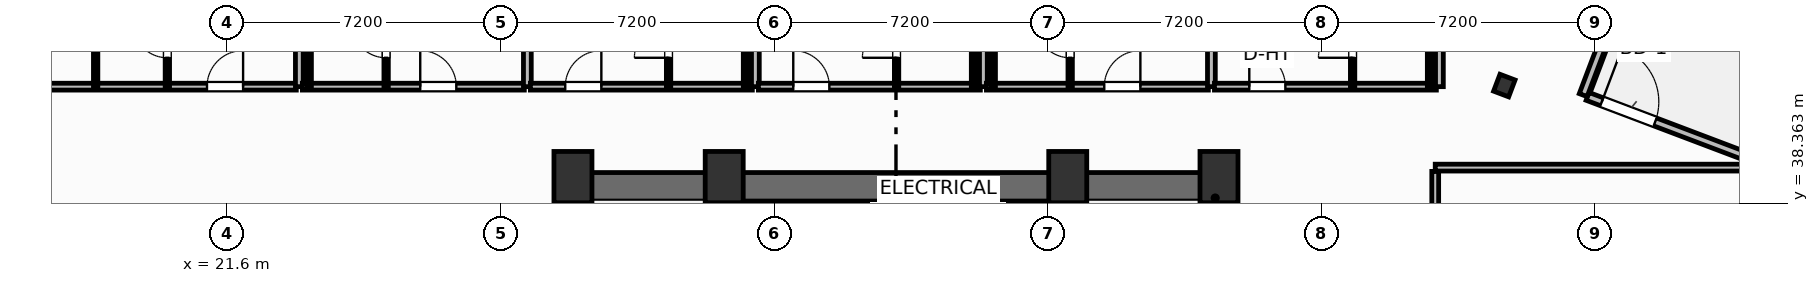
"""IFC4 building model, lengths in metres.
Left out: names, types, materials, properties, quantities, classifications, styles, units other than length and angle.
Written with IfcOpenShell. Run it as: python <this file> out.ifc"""

import sys

from ifc_helpers import new_model, si_unit, direction, frame, frame_2d, origin, origin_2d, place, context, subcontext, project, spatial, rectangle, i_section, extrude, element, fill, save


model = new_model("IFC4")
c1 = context("Model", 3, precision=1e-05, world=origin(), true_north=direction((0.0, 1.0)))
c2 = subcontext(c1, "Body", "Model", "MODEL_VIEW")
j1 = project(units=[si_unit("LENGTHUNIT", "METRE"), si_unit("PLANEANGLEUNIT", "RADIAN")], contexts=[c1])
p1 = place(None, origin())
s1 = spatial("IfcSite", under=j1, at=p1, CompositionType="ELEMENT")
p2 = place(p1, origin())
s2 = spatial("IfcBuilding", under=s1, at=p2, CompositionType="ELEMENT")
p3 = place(p2, frame((0.0, 0.0, 91.0)))
s3 = spatial("IfcBuildingStorey", under=s2, at=p3, CompositionType="ELEMENT", Elevation=91.0)
for number, where, z_axis, x_axis in (
    (1, (30.7, 39.05, 0.0), (0.0, 0.0, 1.0), (1.0, 0.0, 0.0)),
    (2, (34.68, 39.05, 0.0), (0.0, 0.0, 1.0), (1.0, 0.0, 0.0)),
    (3, (43.72, 39.05, 0.0), (0.0, 0.0, 1.0), (1.0, 0.0, 0.0)),
    (4, (47.7, 39.05, 0.0), (0.0, 0.0, 1.0), (1.0, 0.0, 0.0)),
):
    element("IfcColumn", number, at=place(p3, frame(where, z_axis=z_axis, x_axis=x_axis)), inside=s3, PredefinedType="COLUMN", context=c2, shape_type="SweptSolid", body=[
        extrude(rectangle(XDim=1.0, YDim=1.35, at=origin_2d()), origin(), (0.0, 0.0, 1.0), 3.7),
    ])
p4 = place(p3, frame((30.38, 38.795, 0.0), z_axis=(0.0, 0.0, 1.0), x_axis=(1.0, 0.0, 0.0)))
e5 = element("IfcWall", 5, at=p4, inside=s3, PredefinedType="SHEAR", context=c2, shape_type="SweptSolid", body=[
    extrude(rectangle(XDim=17.64, YDim=0.75, at=frame_2d((8.82, 0.0))), origin(), (0.0, 0.0, 1.0), 3.45),
])
for number, where, z_axis, x_axis in (
    (6, (30.755, 29.2, 0.0), (0.0, 0.0, 1.0), (0.0, 1.0, 0.0)),
    (7, (47.645, 29.2, 0.0), (0.0, 0.0, 1.0), (0.0, 1.0, 0.0)),
):
    element("IfcWall", number, at=place(p3, frame(where, z_axis=z_axis, x_axis=x_axis)), inside=s3, PredefinedType="SHEAR", context=c2, shape_type="SweptSolid", body=[
        extrude(rectangle(XDim=9.22, YDim=0.75, at=frame_2d((4.61, 0.0))), origin(), (0.0, 0.0, 1.0), 3.45),
    ])
p5 = place(p3, frame((34.64, 29.2, 0.0), z_axis=(0.0, 0.0, 1.0), x_axis=(0.0, 1.0, 0.0)))
e8 = element("IfcWall", 8, at=p5, inside=s3, PredefinedType="SHEAR", context=c2, shape_type="SweptSolid", body=[
    extrude(rectangle(XDim=9.22, YDim=0.25, at=frame_2d((4.61, 0.0))), origin(), (0.0, 0.0, 1.0), 3.45),
])
p6 = place(p5, frame((0.65, 0.0, 0.0)))
e9 = element("IfcOpeningElement", 9, at=p6, cuts=e8, PredefinedType="OPENING", context=c2, shape_type="SweptSolid", body=[
    extrude(rectangle(XDim=1.05, YDim=2.15, at=frame_2d((0.525, 1.075))), frame((0.0, 0.135, 0.0), z_axis=(0.0, -1.0, 0.0), x_axis=(1.0, 0.0, 0.0)), (0.0, 0.0, 1.0), 0.27),
])
p7 = place(p3, frame((43.76, 29.2, 0.0), z_axis=(0.0, 0.0, 1.0), x_axis=(0.0, 1.0, 0.0)))
e10 = element("IfcWall", 10, at=p7, inside=s3, PredefinedType="SHEAR", context=c2, shape_type="SweptSolid", body=[
    extrude(rectangle(XDim=9.22, YDim=0.25, at=frame_2d((4.61, 0.0))), origin(), (0.0, 0.0, 1.0), 3.45),
])
p8 = place(p7, frame((0.65, 0.0, 0.0)))
e11 = element("IfcOpeningElement", 11, at=p8, cuts=e10, PredefinedType="OPENING", context=c2, shape_type="SweptSolid", body=[
    extrude(rectangle(XDim=1.05, YDim=2.15, at=frame_2d((0.525, 1.075))), frame((0.0, 0.135, 0.0), z_axis=(0.0, -1.0, 0.0), x_axis=(1.0, 0.0, 0.0)), (0.0, 0.0, 1.0), 0.27),
])
p9 = place(p3, frame((55.208, 41.459, 0.0), z_axis=(0.0, 0.0, 1.0), x_axis=(0.935221751401, -0.354062530786, 0.0)))
e12 = element("IfcColumn", 12, at=p9, inside=s3, PredefinedType="COLUMN", context=c2, shape_type="SweptSolid", body=[
    extrude(i_section(OverallWidth=0.424, OverallDepth=0.474, WebThickness=0.048, FlangeThickness=0.077, FilletRadius=0.025, at=origin_2d()), origin(), (0.0, 0.0, 1.0), 3.7),
])
p10 = place(p3, frame((57.399, 41.175, 0.0), z_axis=(0.0, 0.0, 1.0), x_axis=(0.935227640088, -0.354046976001, 0.0)))
e13 = element("IfcWall", 13, at=p10, inside=s3, PredefinedType="SOLIDWALL", context=c2, shape_type="SweptSolid", body=[
    extrude(rectangle(XDim=6.0, YDim=0.22, at=frame_2d((3.0, 0.0))), origin(), (0.0, 0.0, 1.0), 2.73),
])
p11 = place(p10, frame((0.4, 0.0, 0.0)))
e14 = element("IfcOpeningElement", 14, at=p11, cuts=e13, PredefinedType="OPENING", context=c2, shape_type="SweptSolid", body=[
    extrude(rectangle(XDim=1.5, YDim=2.25, at=frame_2d((0.75, 1.125))), frame((0.0, 0.12, 0.0), z_axis=(0.0, -1.0, 0.0), x_axis=(1.0, 0.0, 0.0)), (0.0, 0.0, 1.0), 0.24),
])
p12 = place(p3, frame((57.284, 41.208, 0.0), z_axis=(0.0, 0.0, 1.0), x_axis=(0.354128469405, 0.935196785258, 0.0)))
e15 = element("IfcWall", 15, at=p12, inside=s3, PredefinedType="SOLIDWALL", context=c2, shape_type="SweptSolid", body=[
    extrude(rectangle(XDim=2.1, YDim=0.22, at=frame_2d((1.05, 0.0))), origin(), (0.0, 0.0, 1.0), 2.73),
])
p13 = place(p3, frame((5.506, 41.43, 0.0), z_axis=(0.0, 0.0, 1.0), x_axis=(1.0, 0.0, 0.0)))
e16 = element("IfcWall", 16, at=p13, inside=s3, PredefinedType="PARTITIONING", context=c2, shape_type="SweptSolid", body=[
    extrude(rectangle(XDim=17.914, YDim=0.18, at=frame_2d((8.957, 0.0))), origin(), (0.0, 0.0, 1.0), 3.45),
])
p14 = place(p13, frame((15.564, 0.0, 0.0)))
e17 = element("IfcOpeningElement", 17, at=p14, cuts=e16, PredefinedType="OPENING", context=c2, shape_type="SweptSolid", body=[
    extrude(rectangle(XDim=0.95, YDim=2.15, at=frame_2d((0.475, 1.075))), frame((0.0, 0.1, 0.0), z_axis=(0.0, -1.0, 0.0), x_axis=(1.0, 0.0, 0.0)), (0.0, 0.0, 1.0), 0.2),
])
p15 = place(p3, frame((20.027, 41.43, 0.0), z_axis=(0.0, 0.0, 1.0), x_axis=(0.0, 1.0, 0.0)))
e18 = element("IfcWall", 18, at=p15, inside=s3, PredefinedType="PARTITIONING", context=c2, shape_type="SweptSolid", body=[
    extrude(rectangle(XDim=2.52, YDim=0.115, at=frame_2d((1.26, 0.0))), origin(), (0.0, 0.0, 1.0), 3.45),
])
p16 = place(p15, frame((0.76, 0.0, 0.0)))
e19 = element("IfcOpeningElement", 19, at=p16, cuts=e18, PredefinedType="OPENING", context=c2, shape_type="SweptSolid", body=[
    extrude(rectangle(XDim=0.9, YDim=2.05, at=frame_2d((0.45, 1.025))), frame((0.0, 0.067, 0.0), z_axis=(0.0, -1.0, 0.0), x_axis=(1.0, 0.0, 0.0)), (0.0, 0.0, 1.0), 0.135),
])
p17 = place(p3, frame((18.14, 41.43, 0.0), z_axis=(0.0, 0.0, 1.0), x_axis=(0.0, 1.0, 0.0)))
e20 = element("IfcWall", 20, at=p17, inside=s3, PredefinedType="PARTITIONING", context=c2, shape_type="SweptSolid", body=[
    extrude(rectangle(XDim=2.52, YDim=0.115, at=frame_2d((1.26, 0.0))), origin(), (0.0, 0.0, 1.0), 3.45),
])
p18 = place(p3, frame((23.5, 41.43, 0.0), z_axis=(0.0, 0.0, 1.0), x_axis=(0.0, 1.0, 0.0)))
e21 = element("IfcWall", 21, at=p18, inside=s3, PredefinedType="PARTITIONING", context=c2, shape_type="SweptSolid", body=[
    extrude(rectangle(XDim=14.708, YDim=0.205, at=frame_2d((7.354, 0.0))), origin(), (0.0, 0.0, 1.0), 3.45),
])
p19 = place(p3, frame((23.58, 41.43, 0.0), z_axis=(0.0, 0.0, 1.0), x_axis=(1.0, 0.0, 0.0)))
e22 = element("IfcWall", 22, at=p19, inside=s3, PredefinedType="PARTITIONING", context=c2, shape_type="SweptSolid", body=[
    extrude(rectangle(XDim=5.84, YDim=0.18, at=frame_2d((2.92, 0.0))), origin(), (0.0, 0.0, 1.0), 3.45),
])
p20 = place(p19, frame((3.101, 0.0, 0.0)))
e23 = element("IfcOpeningElement", 23, at=p20, cuts=e22, PredefinedType="OPENING", context=c2, shape_type="SweptSolid", body=[
    extrude(rectangle(XDim=0.95, YDim=2.15, at=frame_2d((0.475, 1.075))), frame((0.0, 0.1, 0.0), z_axis=(0.0, -1.0, 0.0), x_axis=(1.0, 0.0, 0.0)), (0.0, 0.0, 1.0), 0.2),
])
p21 = place(p3, frame((25.784, 41.43, 0.0), z_axis=(0.0, 0.0, 1.0), x_axis=(0.0, 1.0, 0.0)))
e24 = element("IfcWall", 24, at=p21, inside=s3, PredefinedType="PARTITIONING", context=c2, shape_type="SweptSolid", body=[
    extrude(rectangle(XDim=2.52, YDim=0.115, at=frame_2d((1.26, 0.0))), origin(), (0.0, 0.0, 1.0), 3.45),
])
p22 = place(p21, frame((0.76, 0.0, 0.0)))
e25 = element("IfcOpeningElement", 25, at=p22, cuts=e24, PredefinedType="OPENING", context=c2, shape_type="SweptSolid", body=[
    extrude(rectangle(XDim=0.9, YDim=2.05, at=frame_2d((0.45, 1.025))), frame((0.0, 0.067, 0.0), z_axis=(0.0, -1.0, 0.0), x_axis=(1.0, 0.0, 0.0)), (0.0, 0.0, 1.0), 0.135),
])
p23 = place(p3, frame((23.76, 41.43, 0.0), z_axis=(0.0, 0.0, 1.0), x_axis=(0.0, 1.0, 0.0)))
e26 = element("IfcWall", 26, at=p23, inside=s3, PredefinedType="PARTITIONING", context=c2, shape_type="SweptSolid", body=[
    extrude(rectangle(XDim=2.52, YDim=0.115, at=frame_2d((1.26, 0.0))), origin(), (0.0, 0.0, 1.0), 3.45),
])
p24 = place(p3, frame((29.5, 41.43, 0.0), z_axis=(0.0, 0.0, 1.0), x_axis=(0.0, 1.0, 0.0)))
e27 = element("IfcWall", 27, at=p24, inside=s3, PredefinedType="PARTITIONING", context=c2, shape_type="SweptSolid", body=[
    extrude(rectangle(XDim=12.52, YDim=0.205, at=frame_2d((6.26, 0.0))), origin(), (0.0, 0.0, 1.0), 2.58),
])
p25 = place(p3, frame((29.58, 41.43, 0.0), z_axis=(0.0, 0.0, 1.0), x_axis=(1.0, 0.0, 0.0)))
e28 = element("IfcWall", 28, at=p25, inside=s3, PredefinedType="PARTITIONING", context=c2, shape_type="SweptSolid", body=[
    extrude(rectangle(XDim=5.84, YDim=0.18, at=frame_2d((2.92, 0.0))), origin(), (0.0, 0.0, 1.0), 3.45),
])
p26 = place(p25, frame((0.917, 0.0, 0.0)))
e29 = element("IfcOpeningElement", 29, at=p26, cuts=e28, PredefinedType="OPENING", context=c2, shape_type="SweptSolid", body=[
    extrude(rectangle(XDim=0.95, YDim=2.15, at=frame_2d((0.475, 1.075))), frame((0.0, 0.1, 0.0), z_axis=(0.0, -1.0, 0.0), x_axis=(1.0, 0.0, 0.0)), (0.0, 0.0, 1.0), 0.2),
])
p27 = place(p3, frame((33.216, 41.43, 0.0), z_axis=(0.0, 0.0, 1.0), x_axis=(0.0, 1.0, 0.0)))
e30 = element("IfcWall", 30, at=p27, inside=s3, PredefinedType="PARTITIONING", context=c2, shape_type="SweptSolid", body=[
    extrude(rectangle(XDim=2.52, YDim=0.115, at=frame_2d((1.26, 0.0))), origin(), (0.0, 0.0, 1.0), 3.45),
])
p28 = place(p27, frame((0.76, 0.0, 0.0)))
e31 = element("IfcOpeningElement", 31, at=p28, cuts=e30, PredefinedType="OPENING", context=c2, shape_type="SweptSolid", body=[
    extrude(rectangle(XDim=0.9, YDim=2.05, at=frame_2d((0.45, 1.025))), frame((0.0, 0.067, 0.0), z_axis=(0.0, -1.0, 0.0), x_axis=(1.0, 0.0, 0.0)), (0.0, 0.0, 1.0), 0.135),
])
p29 = place(p3, frame((35.24, 41.43, 0.0), z_axis=(0.0, 0.0, 1.0), x_axis=(0.0, 1.0, 0.0)))
e32 = element("IfcWall", 32, at=p29, inside=s3, PredefinedType="PARTITIONING", context=c2, shape_type="SweptSolid", body=[
    extrude(rectangle(XDim=2.52, YDim=0.115, at=frame_2d((1.26, 0.0))), origin(), (0.0, 0.0, 1.0), 3.45),
])
p30 = place(p3, frame((35.5, 41.43, 0.0), z_axis=(0.0, 0.0, 1.0), x_axis=(0.0, 1.0, 0.0)))
e33 = element("IfcWall", 33, at=p30, inside=s3, PredefinedType="PARTITIONING", context=c2, shape_type="SweptSolid", body=[
    extrude(rectangle(XDim=8.003, YDim=0.205, at=frame_2d((4.002, 0.0))), origin(), (0.0, 0.0, 1.0), 3.45),
])
p31 = place(p3, frame((35.58, 41.43, 0.0), z_axis=(0.0, 0.0, 1.0), x_axis=(1.0, 0.0, 0.0)))
e34 = element("IfcWall", 34, at=p31, inside=s3, PredefinedType="PARTITIONING", context=c2, shape_type="SweptSolid", body=[
    extrude(rectangle(XDim=5.84, YDim=0.18, at=frame_2d((2.92, 0.0))), origin(), (0.0, 0.0, 1.0), 3.45),
])
p32 = place(p31, frame((0.917, 0.0, 0.0)))
e35 = element("IfcOpeningElement", 35, at=p32, cuts=e34, PredefinedType="OPENING", context=c2, shape_type="SweptSolid", body=[
    extrude(rectangle(XDim=0.95, YDim=2.15, at=frame_2d((0.475, 1.075))), frame((0.0, 0.1, 0.0), z_axis=(0.0, -1.0, 0.0), x_axis=(1.0, 0.0, 0.0)), (0.0, 0.0, 1.0), 0.2),
])
p33 = place(p3, frame((39.216, 41.43, 0.0), z_axis=(0.0, 0.0, 1.0), x_axis=(0.0, 1.0, 0.0)))
e36 = element("IfcWall", 36, at=p33, inside=s3, PredefinedType="PARTITIONING", context=c2, shape_type="SweptSolid", body=[
    extrude(rectangle(XDim=2.52, YDim=0.115, at=frame_2d((1.26, 0.0))), origin(), (0.0, 0.0, 1.0), 3.45),
])
p34 = place(p33, frame((0.76, 0.0, 0.0)))
e37 = element("IfcOpeningElement", 37, at=p34, cuts=e36, PredefinedType="OPENING", context=c2, shape_type="SweptSolid", body=[
    extrude(rectangle(XDim=0.9, YDim=2.05, at=frame_2d((0.45, 1.025))), frame((0.0, 0.067, 0.0), z_axis=(0.0, -1.0, 0.0), x_axis=(1.0, 0.0, 0.0)), (0.0, 0.0, 1.0), 0.135),
])
p35 = place(p3, frame((41.24, 41.43, 0.0), z_axis=(0.0, 0.0, 1.0), x_axis=(0.0, 1.0, 0.0)))
e38 = element("IfcWall", 38, at=p35, inside=s3, PredefinedType="PARTITIONING", context=c2, shape_type="SweptSolid", body=[
    extrude(rectangle(XDim=2.52, YDim=0.115, at=frame_2d((1.26, 0.0))), origin(), (0.0, 0.0, 1.0), 3.45),
])
p36 = place(p3, frame((41.5, 41.43, 0.0), z_axis=(0.0, 0.0, 1.0), x_axis=(0.0, 1.0, 0.0)))
e39 = element("IfcWall", 39, at=p36, inside=s3, PredefinedType="PARTITIONING", context=c2, shape_type="SweptSolid", body=[
    extrude(rectangle(XDim=7.977, YDim=0.205, at=frame_2d((3.989, 0.0))), origin(), (0.0, 0.0, 1.0), 3.45),
])
p37 = place(p3, frame((41.58, 41.43, 0.0), z_axis=(0.0, 0.0, 1.0), x_axis=(1.0, 0.0, 0.0)))
e40 = element("IfcWall", 40, at=p37, inside=s3, PredefinedType="PARTITIONING", context=c2, shape_type="SweptSolid", body=[
    extrude(rectangle(XDim=5.84, YDim=0.18, at=frame_2d((2.92, 0.0))), origin(), (0.0, 0.0, 1.0), 3.45),
])
p38 = place(p37, frame((3.101, 0.0, 0.0)))
e41 = element("IfcOpeningElement", 41, at=p38, cuts=e40, PredefinedType="OPENING", context=c2, shape_type="SweptSolid", body=[
    extrude(rectangle(XDim=0.95, YDim=2.15, at=frame_2d((0.475, 1.075))), frame((0.0, 0.1, 0.0), z_axis=(0.0, -1.0, 0.0), x_axis=(1.0, 0.0, 0.0)), (0.0, 0.0, 1.0), 0.2),
])
p39 = place(p3, frame((43.784, 41.43, 0.0), z_axis=(0.0, 0.0, 1.0), x_axis=(0.0, 1.0, 0.0)))
e42 = element("IfcWall", 42, at=p39, inside=s3, PredefinedType="PARTITIONING", context=c2, shape_type="SweptSolid", body=[
    extrude(rectangle(XDim=2.52, YDim=0.115, at=frame_2d((1.26, 0.0))), origin(), (0.0, 0.0, 1.0), 3.45),
])
p40 = place(p39, frame((0.76, 0.0, 0.0)))
e43 = element("IfcOpeningElement", 43, at=p40, cuts=e42, PredefinedType="OPENING", context=c2, shape_type="SweptSolid", body=[
    extrude(rectangle(XDim=0.9, YDim=2.05, at=frame_2d((0.45, 1.025))), frame((0.0, 0.067, 0.0), z_axis=(0.0, -1.0, 0.0), x_axis=(1.0, 0.0, 0.0)), (0.0, 0.0, 1.0), 0.135),
])
p41 = place(p3, frame((41.76, 41.43, 0.0), z_axis=(0.0, 0.0, 1.0), x_axis=(0.0, 1.0, 0.0)))
e44 = element("IfcWall", 44, at=p41, inside=s3, PredefinedType="PARTITIONING", context=c2, shape_type="SweptSolid", body=[
    extrude(rectangle(XDim=2.52, YDim=0.115, at=frame_2d((1.26, 0.0))), origin(), (0.0, 0.0, 1.0), 3.45),
])
p42 = place(p3, frame((47.5, 41.43, 0.0), z_axis=(0.0, 0.0, 1.0), x_axis=(0.0, 1.0, 0.0)))
e45 = element("IfcWall", 45, at=p42, inside=s3, PredefinedType="PARTITIONING", context=c2, shape_type="SweptSolid", body=[
    extrude(rectangle(XDim=3.46, YDim=0.205, at=frame_2d((1.73, 0.0))), origin(), (0.0, 0.0, 1.0), 3.45),
])
p43 = place(p3, frame((47.58, 41.43, 0.0), z_axis=(0.0, 0.0, 1.0), x_axis=(1.0, 0.0, 0.0)))
e46 = element("IfcWall", 46, at=p43, inside=s3, PredefinedType="PARTITIONING", context=c2, shape_type="SweptSolid", body=[
    extrude(rectangle(XDim=5.84, YDim=0.18, at=frame_2d((2.92, 0.0))), origin(), (0.0, 0.0, 1.0), 3.45),
])
p44 = place(p43, frame((0.917, 0.0, 0.0)))
e47 = element("IfcOpeningElement", 47, at=p44, cuts=e46, PredefinedType="OPENING", context=c2, shape_type="SweptSolid", body=[
    extrude(rectangle(XDim=0.95, YDim=2.15, at=frame_2d((0.475, 1.075))), frame((0.0, 0.1, 0.0), z_axis=(0.0, -1.0, 0.0), x_axis=(1.0, 0.0, 0.0)), (0.0, 0.0, 1.0), 0.2),
])
p45 = place(p3, frame((51.216, 41.43, 0.0), z_axis=(0.0, 0.0, 1.0), x_axis=(0.0, 1.0, 0.0)))
e48 = element("IfcWall", 48, at=p45, inside=s3, PredefinedType="PARTITIONING", context=c2, shape_type="SweptSolid", body=[
    extrude(rectangle(XDim=2.52, YDim=0.115, at=frame_2d((1.26, 0.0))), origin(), (0.0, 0.0, 1.0), 3.45),
])
p46 = place(p45, frame((0.76, 0.0, 0.0)))
e49 = element("IfcOpeningElement", 49, at=p46, cuts=e48, PredefinedType="OPENING", context=c2, shape_type="SweptSolid", body=[
    extrude(rectangle(XDim=0.9, YDim=2.05, at=frame_2d((0.45, 1.025))), frame((0.0, 0.067, 0.0), z_axis=(0.0, -1.0, 0.0), x_axis=(1.0, 0.0, 0.0)), (0.0, 0.0, 1.0), 0.135),
])
p47 = place(p3, frame((53.24, 41.43, 0.0), z_axis=(0.0, 0.0, 1.0), x_axis=(0.0, 1.0, 0.0)))
e50 = element("IfcWall", 50, at=p47, inside=s3, PredefinedType="PARTITIONING", context=c2, shape_type="SweptSolid", body=[
    extrude(rectangle(XDim=2.52, YDim=0.115, at=frame_2d((1.26, 0.0))), origin(), (0.0, 0.0, 1.0), 3.45),
])
p48 = place(p3, frame((53.5, 41.43, 0.0), z_axis=(0.0, 0.0, 1.0), x_axis=(0.0, 1.0, 0.0)))
e51 = element("IfcWall", 51, at=p48, inside=s3, PredefinedType="PARTITIONING", context=c2, shape_type="SweptSolid", body=[
    extrude(rectangle(XDim=3.434, YDim=0.205, at=frame_2d((1.717, 0.0))), origin(), (0.0, 0.0, 1.0), 3.45),
])
p49 = place(p3, frame((53.39, 27.53, 0.0), z_axis=(0.0, 0.0, 1.0), x_axis=(0.0, 1.0, 0.0)))
e52 = element("IfcWall", 52, at=p49, inside=s3, PredefinedType="PARTITIONING", context=c2, shape_type="SweptSolid", body=[
    extrude(rectangle(XDim=11.67, YDim=0.18, at=frame_2d((5.835, 0.0))), origin(), (0.0, 0.0, 1.0), 3.45),
])
p50 = place(p49, frame((5.8, 0.0, 0.0)))
e53 = element("IfcOpeningElement", 53, at=p50, cuts=e52, PredefinedType="OPENING", context=c2, shape_type="SweptSolid", body=[
    extrude(rectangle(XDim=0.92, YDim=2.05, at=frame_2d((0.46, 1.025))), frame((0.0, 0.1, 0.0), z_axis=(0.0, -1.0, 0.0), x_axis=(1.0, 0.0, 0.0)), (0.0, 0.0, 1.0), 0.2),
])
p51 = place(p3, frame((53.39, 39.3, 0.0), z_axis=(0.0, 0.0, 1.0), x_axis=(1.0, 0.0, 0.0)))
e54 = element("IfcWall", 54, at=p51, inside=s3, PredefinedType="PARTITIONING", context=c2, shape_type="SweptSolid", body=[
    extrude(rectangle(XDim=8.876, YDim=0.18, at=frame_2d((4.438, 0.0))), origin(), (0.0, 0.0, 1.0), 3.45),
])
p52 = place(p11, origin())
e55 = element("IfcDoor", 55, at=p52, inside=s3, OperationType="SINGLE_SWING_LEFT", PredefinedType="DOOR", context=c2, shape_type="SweptSolid", body=[
    extrude(rectangle(XDim=1.5, YDim=2.25, at=frame_2d((0.75, 1.125))), frame((0.0, 0.025, 0.0), z_axis=(0.0, -1.0, 0.0), x_axis=(1.0, 0.0, 0.0)), (0.0, 0.0, 1.0), 0.05),
])
fill(e14, e55)
p53 = place(p14, origin())
e56 = element("IfcDoor", 56, at=p53, inside=s3, OperationType="SINGLE_SWING_RIGHT", PredefinedType="DOOR", context=c2, shape_type="SweptSolid", body=[
    extrude(rectangle(XDim=0.95, YDim=2.15, at=frame_2d((0.475, 1.075))), frame((0.0, 0.025, 0.0), z_axis=(0.0, -1.0, 0.0), x_axis=(1.0, 0.0, 0.0)), (0.0, 0.0, 1.0), 0.05),
])
fill(e17, e56)
p54 = place(p16, origin())
e57 = element("IfcDoor", 57, at=p54, inside=s3, OperationType="SINGLE_SWING_RIGHT", PredefinedType="DOOR", context=c2, shape_type="SweptSolid", body=[
    extrude(rectangle(XDim=0.9, YDim=2.05, at=frame_2d((0.45, 1.025))), frame((0.0, 0.025, 0.0), z_axis=(0.0, -1.0, 0.0), x_axis=(1.0, 0.0, 0.0)), (0.0, 0.0, 1.0), 0.05),
])
fill(e19, e57)
p55 = place(p20, origin())
e58 = element("IfcDoor", 58, at=p55, inside=s3, OperationType="SINGLE_SWING_LEFT", PredefinedType="DOOR", context=c2, shape_type="SweptSolid", body=[
    extrude(rectangle(XDim=0.95, YDim=2.15, at=frame_2d((0.475, 1.075))), frame((0.0, 0.025, 0.0), z_axis=(0.0, -1.0, 0.0), x_axis=(1.0, 0.0, 0.0)), (0.0, 0.0, 1.0), 0.05),
])
fill(e23, e58)
p56 = place(p22, origin())
e59 = element("IfcDoor", 59, at=p56, inside=s3, OperationType="SINGLE_SWING_RIGHT", PredefinedType="DOOR", context=c2, shape_type="SweptSolid", body=[
    extrude(rectangle(XDim=0.9, YDim=2.05, at=frame_2d((0.45, 1.025))), frame((0.0, 0.025, 0.0), z_axis=(0.0, -1.0, 0.0), x_axis=(1.0, 0.0, 0.0)), (0.0, 0.0, 1.0), 0.05),
])
fill(e25, e59)
p57 = place(p26, origin())
e60 = element("IfcDoor", 60, at=p57, inside=s3, OperationType="SINGLE_SWING_RIGHT", PredefinedType="DOOR", context=c2, shape_type="SweptSolid", body=[
    extrude(rectangle(XDim=0.95, YDim=2.15, at=frame_2d((0.475, 1.075))), frame((0.0, 0.025, 0.0), z_axis=(0.0, -1.0, 0.0), x_axis=(1.0, 0.0, 0.0)), (0.0, 0.0, 1.0), 0.05),
])
fill(e29, e60)
p58 = place(p28, origin())
e61 = element("IfcDoor", 61, at=p58, inside=s3, OperationType="SINGLE_SWING_LEFT", PredefinedType="DOOR", context=c2, shape_type="SweptSolid", body=[
    extrude(rectangle(XDim=0.9, YDim=2.05, at=frame_2d((0.45, 1.025))), frame((0.0, 0.025, 0.0), z_axis=(0.0, -1.0, 0.0), x_axis=(1.0, 0.0, 0.0)), (0.0, 0.0, 1.0), 0.05),
])
fill(e31, e61)
p59 = place(p32, origin())
e62 = element("IfcDoor", 62, at=p59, inside=s3, OperationType="SINGLE_SWING_LEFT", PredefinedType="DOOR", context=c2, shape_type="SweptSolid", body=[
    extrude(rectangle(XDim=0.95, YDim=2.15, at=frame_2d((0.475, 1.075))), frame((0.0, 0.025, 0.0), z_axis=(0.0, -1.0, 0.0), x_axis=(1.0, 0.0, 0.0)), (0.0, 0.0, 1.0), 0.05),
])
fill(e35, e62)
p60 = place(p34, origin())
e63 = element("IfcDoor", 63, at=p60, inside=s3, OperationType="SINGLE_SWING_LEFT", PredefinedType="DOOR", context=c2, shape_type="SweptSolid", body=[
    extrude(rectangle(XDim=0.9, YDim=2.05, at=frame_2d((0.45, 1.025))), frame((0.0, 0.025, 0.0), z_axis=(0.0, -1.0, 0.0), x_axis=(1.0, 0.0, 0.0)), (0.0, 0.0, 1.0), 0.05),
])
fill(e37, e63)
p61 = place(p38, origin())
e64 = element("IfcDoor", 64, at=p61, inside=s3, OperationType="SINGLE_SWING_RIGHT", PredefinedType="DOOR", context=c2, shape_type="SweptSolid", body=[
    extrude(rectangle(XDim=0.95, YDim=2.15, at=frame_2d((0.475, 1.075))), frame((0.0, 0.025, 0.0), z_axis=(0.0, -1.0, 0.0), x_axis=(1.0, 0.0, 0.0)), (0.0, 0.0, 1.0), 0.05),
])
fill(e41, e64)
p62 = place(p40, origin())
e65 = element("IfcDoor", 65, at=p62, inside=s3, OperationType="SINGLE_SWING_RIGHT", PredefinedType="DOOR", context=c2, shape_type="SweptSolid", body=[
    extrude(rectangle(XDim=0.9, YDim=2.05, at=frame_2d((0.45, 1.025))), frame((0.0, 0.025, 0.0), z_axis=(0.0, -1.0, 0.0), x_axis=(1.0, 0.0, 0.0)), (0.0, 0.0, 1.0), 0.05),
])
fill(e43, e65)
p63 = place(p44, origin())
e66 = element("IfcDoor", 66, at=p63, inside=s3, OperationType="SINGLE_SWING_LEFT", PredefinedType="DOOR", context=c2, shape_type="SweptSolid", body=[
    extrude(rectangle(XDim=0.95, YDim=2.15, at=frame_2d((0.475, 1.075))), frame((0.0, 0.025, 0.0), z_axis=(0.0, -1.0, 0.0), x_axis=(1.0, 0.0, 0.0)), (0.0, 0.0, 1.0), 0.05),
])
fill(e47, e66)
p64 = place(p46, origin())
e67 = element("IfcDoor", 67, at=p64, inside=s3, OperationType="SINGLE_SWING_LEFT", PredefinedType="DOOR", context=c2, shape_type="SweptSolid", body=[
    extrude(rectangle(XDim=0.9, YDim=2.05, at=frame_2d((0.45, 1.025))), frame((0.0, 0.025, 0.0), z_axis=(0.0, -1.0, 0.0), x_axis=(1.0, 0.0, 0.0)), (0.0, 0.0, 1.0), 0.05),
])
fill(e49, e67)
save(model, sys.argv[1])
